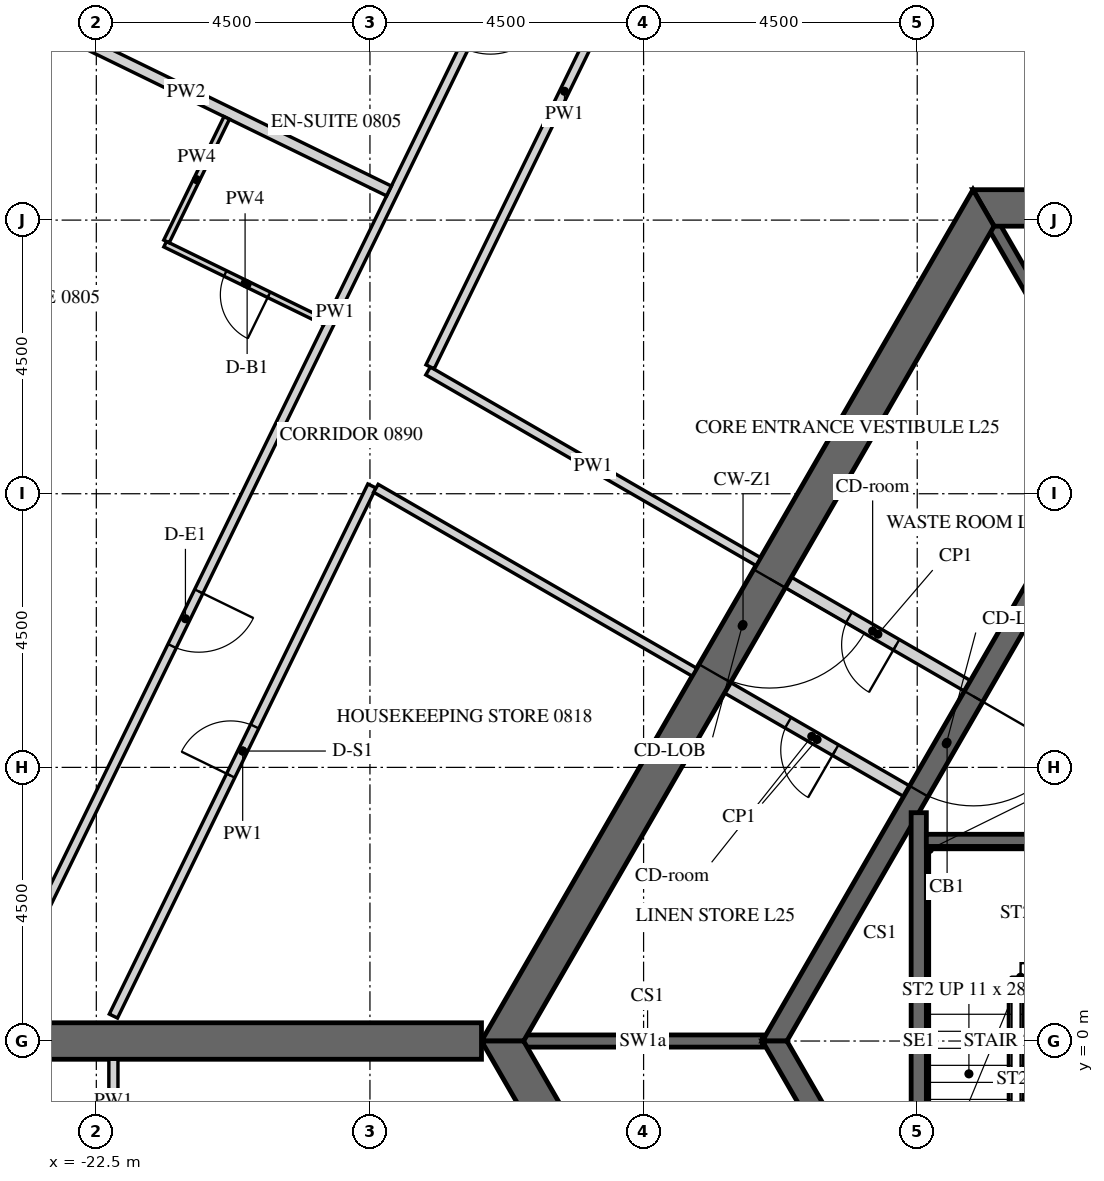
"""IFC4 building model, lengths in metres.
Left out: names, types, materials, properties, quantities, classifications, styles, units other than length and angle.
Written with IfcOpenShell. Run it as: python <this file> out.ifc"""

import sys

from ifc_helpers import new_model, si_unit, direction, frame, frame_2d, origin, place, context, subcontext, project, spatial, polyline, rectangle, outline, extrude, element, fill, save


model = new_model("IFC4")
c1 = context("Model", 3, precision=1e-05, world=origin(), true_north=direction((0.0, 1.0)))
c2 = subcontext(c1, "Body", "Model", "MODEL_VIEW")
j1 = project(units=[si_unit("LENGTHUNIT", "METRE"), si_unit("PLANEANGLEUNIT", "RADIAN")], contexts=[c1])
p1 = place(None, origin())
s1 = spatial("IfcSite", under=j1, at=p1, CompositionType="ELEMENT")
p2 = place(p1, origin())
s2 = spatial("IfcBuilding", under=s1, at=p2, CompositionType="ELEMENT")
p3 = place(p2, frame((0.0, 0.0, 111.6)))
s3 = spatial("IfcBuildingStorey", under=s2, at=p3, CompositionType="ELEMENT", Elevation=111.6)
p4 = place(p3, frame((-19.595, 27.633, -0.15), z_axis=(0.0, 0.0, 1.0), x_axis=(-0.438368285794, -0.898795441694, 0.0)))
e1 = element("IfcWall", 1, at=p4, inside=s3, PredefinedType="SOLIDWALL", context=c2, shape_type="SweptSolid", body=[
    extrude(outline(polyline([(-0.026, -0.275), (30.093, -0.275), (30.048, 0.275), (0.026, 0.275), (-0.026, -0.275)])), origin(), (0.0, 0.0, 1.0), 3.9),
])
p5 = place(p4, frame((1.236, 0.0, 1.05)))
e2 = element("IfcOpeningElement", 2, at=p5, cuts=e1, PredefinedType="OPENING", context=c2, shape_type="SweptSolid", body=[
    extrude(rectangle(XDim=2.4, YDim=2.4, at=frame_2d((1.2, 1.2))), frame((0.0, 0.285, 0.0), z_axis=(0.0, -1.0, 0.0), x_axis=(1.0, 0.0, 0.0)), (0.0, 0.0, 1.0), 0.57),
])
p6 = place(p4, frame((4.835, 0.0, 1.05)))
e3 = element("IfcOpeningElement", 3, at=p6, cuts=e1, PredefinedType="OPENING", context=c2, shape_type="SweptSolid", body=[
    extrude(rectangle(XDim=2.4, YDim=2.4, at=frame_2d((1.2, 1.2))), frame((0.0, 0.285, 0.0), z_axis=(0.0, -1.0, 0.0), x_axis=(1.0, 0.0, 0.0)), (0.0, 0.0, 1.0), 0.57),
])
p7 = place(p4, frame((8.436, 0.0, 1.05)))
e4 = element("IfcOpeningElement", 4, at=p7, cuts=e1, PredefinedType="OPENING", context=c2, shape_type="SweptSolid", body=[
    extrude(rectangle(XDim=2.4, YDim=2.4, at=frame_2d((1.2, 1.2))), frame((0.0, 0.285, 0.0), z_axis=(0.0, -1.0, 0.0), x_axis=(1.0, 0.0, 0.0)), (0.0, 0.0, 1.0), 0.57),
])
p8 = place(p4, frame((12.035, 0.0, 1.05)))
e5 = element("IfcOpeningElement", 5, at=p8, cuts=e1, PredefinedType="OPENING", context=c2, shape_type="SweptSolid", body=[
    extrude(rectangle(XDim=2.4, YDim=2.4, at=frame_2d((1.2, 1.2))), frame((0.0, 0.285, 0.0), z_axis=(0.0, -1.0, 0.0), x_axis=(1.0, 0.0, 0.0)), (0.0, 0.0, 1.0), 0.57),
])
p9 = place(p4, frame((15.635, 0.0, 1.05)))
e6 = element("IfcOpeningElement", 6, at=p9, cuts=e1, PredefinedType="OPENING", context=c2, shape_type="SweptSolid", body=[
    extrude(rectangle(XDim=2.4, YDim=2.4, at=frame_2d((1.2, 1.2))), frame((0.0, 0.285, 0.0), z_axis=(0.0, -1.0, 0.0), x_axis=(1.0, 0.0, 0.0)), (0.0, 0.0, 1.0), 0.57),
])
p10 = place(p4, frame((19.236, 0.0, 1.05)))
e7 = element("IfcOpeningElement", 7, at=p10, cuts=e1, PredefinedType="OPENING", context=c2, shape_type="SweptSolid", body=[
    extrude(rectangle(XDim=2.4, YDim=2.4, at=frame_2d((1.2, 1.2))), frame((0.0, 0.285, 0.0), z_axis=(0.0, -1.0, 0.0), x_axis=(1.0, 0.0, 0.0)), (0.0, 0.0, 1.0), 0.57),
])
p11 = place(p4, frame((22.835, 0.0, 1.05)))
e8 = element("IfcOpeningElement", 8, at=p11, cuts=e1, PredefinedType="OPENING", context=c2, shape_type="SweptSolid", body=[
    extrude(rectangle(XDim=2.4, YDim=2.4, at=frame_2d((1.2, 1.2))), frame((0.0, 0.285, 0.0), z_axis=(0.0, -1.0, 0.0), x_axis=(1.0, 0.0, 0.0)), (0.0, 0.0, 1.0), 0.57),
])
p12 = place(p4, frame((26.436, 0.0, 1.05)))
e9 = element("IfcOpeningElement", 9, at=p12, cuts=e1, PredefinedType="OPENING", context=c2, shape_type="SweptSolid", body=[
    extrude(rectangle(XDim=2.4, YDim=2.4, at=frame_2d((1.2, 1.2))), frame((0.0, 0.285, 0.0), z_axis=(0.0, -1.0, 0.0), x_axis=(1.0, 0.0, 0.0)), (0.0, 0.0, 1.0), 0.57),
])
p13 = place(p3, frame((-7.91, 13.7, -0.15), z_axis=(0.0, 0.0, 1.0), x_axis=(-0.499999880136, -0.866025472988, 0.0)))
e10 = element("IfcWall", 10, at=p13, inside=s3, PredefinedType="SHEAR", context=c2, shape_type="SweptSolid", body=[
    extrude(outline(polyline([(-0.173, -0.3), (15.993, -0.3), (15.646, 0.3), (0.173, 0.3), (-0.173, -0.3)])), origin(), (0.0, 0.0, 1.0), 3.9),
])
p14 = place(p13, frame((7.039, 0.0, 0.15)))
e11 = element("IfcOpeningElement", 11, at=p14, cuts=e10, PredefinedType="OPENING", context=c2, shape_type="SweptSolid", body=[
    extrude(rectangle(XDim=1.8, YDim=2.4, at=frame_2d((0.9, 1.2))), frame((0.0, 0.31, 0.0), z_axis=(0.0, -1.0, 0.0), x_axis=(1.0, 0.0, 0.0)), (0.0, 0.0, 1.0), 0.62),
])
p15 = place(p3, frame((-15.819, 0.0, -0.15), z_axis=(0.0, 0.0, 1.0), x_axis=(0.499999880136, -0.866025472988, 0.0)))
e12 = element("IfcWall", 12, at=p15, inside=s3, PredefinedType="SHEAR", context=c2, shape_type="SweptSolid", body=[
    extrude(outline(polyline([(-0.173, -0.3), (15.993, -0.3), (15.646, 0.3), (0.173, 0.3), (-0.173, -0.3)])), origin(), (0.0, 0.0, 1.0), 3.9),
])
p16 = place(p15, frame((6.981, 0.0, 0.15)))
e13 = element("IfcOpeningElement", 13, at=p16, cuts=e12, PredefinedType="OPENING", context=c2, shape_type="SweptSolid", body=[
    extrude(rectangle(XDim=1.8, YDim=2.4, at=frame_2d((0.9, 1.2))), frame((0.0, 0.31, 0.0), z_axis=(0.0, -1.0, 0.0), x_axis=(1.0, 0.0, 0.0)), (0.0, 0.0, 1.0), 0.62),
])
p17 = place(p3, frame((7.91, 13.7, -0.15), z_axis=(0.0, 0.0, 1.0), x_axis=(-1.0, 0.0, 0.0)))
e14 = element("IfcWall", 14, at=p17, inside=s3, PredefinedType="SHEAR", context=c2, shape_type="SweptSolid", body=[
    extrude(outline(polyline([(-0.173, -0.3), (15.993, -0.3), (15.646, 0.3), (0.173, 0.3), (-0.173, -0.3)])), origin(), (0.0, 0.0, 1.0), 3.9),
])
p18 = place(p17, frame((7.31, 0.0, 0.15)))
e15 = element("IfcOpeningElement", 15, at=p18, cuts=e14, PredefinedType="OPENING", context=c2, shape_type="SweptSolid", body=[
    extrude(rectangle(XDim=1.2, YDim=2.4, at=frame_2d((0.6, 1.2))), frame((0.0, 0.31, 0.0), z_axis=(0.0, -1.0, 0.0), x_axis=(1.0, 0.0, 0.0)), (0.0, 0.0, 1.0), 0.62),
])
p19 = place(p3, frame((-16.166, 0.0, -0.15), z_axis=(0.0, 0.0, 1.0), x_axis=(-1.0, 0.0, 0.0)))
e16 = element("IfcWall", 16, at=p19, inside=s3, PredefinedType="SHEAR", context=c2, shape_type="SweptSolid", body=[
    extrude(rectangle(XDim=16.509, YDim=0.6, at=frame_2d((8.254, 0.0))), origin(), (0.0, 0.0, 1.0), 3.9),
])
p20 = place(p19, frame((7.354, 0.0, 0.15)))
e17 = element("IfcOpeningElement", 17, at=p20, cuts=e16, PredefinedType="OPENING", context=c2, shape_type="SweptSolid", body=[
    extrude(rectangle(XDim=1.8, YDim=2.4, at=frame_2d((0.9, 1.2))), frame((0.0, 0.31, 0.0), z_axis=(0.0, -1.0, 0.0), x_axis=(1.0, 0.0, 0.0)), (0.0, 0.0, 1.0), 0.62),
])
p21 = place(p3, frame((-5.673, 9.825, -0.15), z_axis=(0.0, 0.0, 1.0), x_axis=(-0.499995046907, -0.866028263435, 0.0)))
e18 = element("IfcWall", 18, at=p21, inside=s3, PredefinedType="SHEAR", context=c2, shape_type="SweptSolid", body=[
    extrude(outline(polyline([(-0.101, -0.175), (11.446, -0.175), (11.244, 0.175), (0.101, 0.175), (-0.101, -0.175)])), origin(), (0.0, 0.0, 1.0), 3.9),
])
p22 = place(p21, frame((4.801, 0.0, 0.15)))
e19 = element("IfcOpeningElement", 19, at=p22, cuts=e18, PredefinedType="OPENING", context=c2, shape_type="SweptSolid", body=[
    extrude(rectangle(XDim=1.8, YDim=2.4, at=frame_2d((0.9, 1.2))), frame((0.0, 0.185, 0.0), z_axis=(0.0, -1.0, 0.0), x_axis=(1.0, 0.0, 0.0)), (0.0, 0.0, 1.0), 0.37),
])
p23 = place(p3, frame((-11.345, 0.0, -0.15), z_axis=(0.0, 0.0, 1.0), x_axis=(0.499995046907, -0.866028263435, 0.0)))
e20 = element("IfcWall", 20, at=p23, inside=s3, PredefinedType="SHEAR", context=c2, shape_type="SweptSolid", body=[
    extrude(outline(polyline([(-0.101, -0.175), (11.446, -0.175), (11.244, 0.175), (0.101, 0.175), (-0.101, -0.175)])), origin(), (0.0, 0.0, 1.0), 3.9),
])
p24 = place(p23, frame((4.744, 0.0, 0.15)))
e21 = element("IfcOpeningElement", 21, at=p24, cuts=e20, PredefinedType="OPENING", context=c2, shape_type="SweptSolid", body=[
    extrude(rectangle(XDim=1.8, YDim=2.4, at=frame_2d((0.9, 1.2))), frame((0.0, 0.185, 0.0), z_axis=(0.0, -1.0, 0.0), x_axis=(1.0, 0.0, 0.0)), (0.0, 0.0, 1.0), 0.37),
])
p25 = place(p3, frame((-5.773, 10.0, -0.15), z_axis=(0.0, 0.0, 1.0), x_axis=(-0.500038251005, 0.86600331843, 0.0)))
e22 = element("IfcWall", 22, at=p25, inside=s3, PredefinedType="SHEAR", context=c2, shape_type="SweptSolid", body=[
    extrude(rectangle(XDim=3.926, YDim=0.2, at=frame_2d((1.963, 0.0))), origin(), (0.0, 0.0, 1.0), 3.9),
])
p26 = place(p3, frame((-11.547, 0.0, -0.15), z_axis=(0.0, 0.0, 1.0), x_axis=(-1.0, 0.0, 0.0)))
e23 = element("IfcWall", 23, at=p26, inside=s3, PredefinedType="SHEAR", context=c2, shape_type="SweptSolid", body=[
    extrude(rectangle(XDim=3.926, YDim=0.2, at=frame_2d((1.963, 0.0))), origin(), (0.0, 0.0, 1.0), 3.9),
])
p27 = place(p3, frame((-9.175, 4.109, 0.0), z_axis=(0.0, 0.0, 1.0), x_axis=(-0.865989465428, 0.500062241894, 0.0)))
e24 = element("IfcWall", 24, at=p27, inside=s3, PredefinedType="PARTITIONING", context=c2, shape_type="SweptSolid", body=[
    extrude(rectangle(XDim=3.4, YDim=0.2, at=frame_2d((1.7, 0.0))), origin(), (0.0, 0.0, 1.0), 3.65),
])
p28 = place(p27, frame((1.351, 0.0, 0.0)))
e25 = element("IfcOpeningElement", 25, at=p28, cuts=e24, PredefinedType="OPENING", context=c2, shape_type="SweptSolid", body=[
    extrude(rectangle(XDim=0.9, YDim=2.1, at=frame_2d((0.45, 1.05))), frame((0.0, 0.11, 0.0), z_axis=(0.0, -1.0, 0.0), x_axis=(1.0, 0.0, 0.0)), (0.0, 0.0, 1.0), 0.22),
])
p29 = place(p3, frame((-8.175, 5.841, 0.0), z_axis=(0.0, 0.0, 1.0), x_axis=(-0.866020560687, 0.500008388397, 0.0)))
e26 = element("IfcWall", 26, at=p29, inside=s3, PredefinedType="PARTITIONING", context=c2, shape_type="SweptSolid", body=[
    extrude(rectangle(XDim=3.4, YDim=0.2, at=frame_2d((1.7, 0.0))), origin(), (0.0, 0.0, 1.0), 3.65),
])
p30 = place(p29, frame((1.35, 0.0, 0.0)))
e27 = element("IfcOpeningElement", 27, at=p30, cuts=e26, PredefinedType="OPENING", context=c2, shape_type="SweptSolid", body=[
    extrude(rectangle(XDim=0.9, YDim=2.1, at=frame_2d((0.45, 1.05))), frame((0.0, 0.11, 0.0), z_axis=(0.0, -1.0, 0.0), x_axis=(1.0, 0.0, 0.0)), (0.0, 0.0, 1.0), 0.22),
])
p31 = place(p3, frame((-8.975, -3.755, -0.25), z_axis=(0.0, 0.0, 1.0), x_axis=(0.0, 1.0, 0.0)))
e28 = element("IfcWall", 28, at=p31, inside=s3, PredefinedType="SHEAR", context=c2, shape_type="SweptSolid", body=[
    extrude(rectangle(XDim=7.51, YDim=0.25, at=frame_2d((3.755, 0.0))), origin(), (0.0, 0.0, 1.0), 3.9),
])
p32 = place(p3, frame((-8.85, 3.3, -0.25), z_axis=(0.0, 0.0, 1.0), x_axis=(1.0, 0.0, 0.0)))
e29 = element("IfcWall", 29, at=p32, inside=s3, PredefinedType="SHEAR", context=c2, shape_type="SweptSolid", body=[
    extrude(rectangle(XDim=2.95, YDim=0.2, at=frame_2d((1.475, 0.0))), origin(), (0.0, 0.0, 1.0), 3.9),
])
p33 = place(p3, frame((-13.752, 21.875, 0.0), z_axis=(0.0, 0.0, 1.0), x_axis=(-0.438376846054, -0.898791266559, 0.0)))
e30 = element("IfcWall", 30, at=p33, inside=s3, PredefinedType="PARTITIONING", context=c2, shape_type="SweptSolid", body=[
    extrude(rectangle(XDim=22.002, YDim=0.15, at=frame_2d((11.001, 0.0))), origin(), (0.0, 0.0, 1.0), 2.988),
])
p34 = place(p33, frame((5.169, 0.0, 0.0)))
e31 = element("IfcOpeningElement", 31, at=p34, cuts=e30, PredefinedType="OPENING", context=c2, shape_type="SweptSolid", body=[
    extrude(rectangle(XDim=1.0, YDim=2.1, at=frame_2d((0.5, 1.05))), frame((0.0, 0.085, 0.0), z_axis=(0.0, -1.0, 0.0), x_axis=(1.0, 0.0, 0.0)), (0.0, 0.0, 1.0), 0.17),
])
p35 = place(p33, frame((16.112, 0.0, 0.0)))
e32 = element("IfcOpeningElement", 32, at=p35, cuts=e30, PredefinedType="OPENING", context=c2, shape_type="SweptSolid", body=[
    extrude(rectangle(XDim=1.0, YDim=2.1, at=frame_2d((0.5, 1.05))), frame((0.0, 0.085, 0.0), z_axis=(0.0, -1.0, 0.0), x_axis=(1.0, 0.0, 0.0)), (0.0, 0.0, 1.0), 0.17),
])
p36 = place(p3, frame((-11.614, 7.884, 0.0), z_axis=(0.0, 0.0, 1.0), x_axis=(-0.866025438137, 0.4999999405, 0.0)))
e33 = element("IfcWall", 33, at=p36, inside=s3, PredefinedType="PARTITIONING", context=c2, shape_type="SweptSolid", body=[
    extrude(rectangle(XDim=6.271, YDim=0.15, at=frame_2d((3.135, 0.0))), origin(), (0.0, 0.0, 1.0), 2.988),
])
p37 = place(p3, frame((-17.011, 11.087, 0.0), z_axis=(0.0, 0.0, 1.0), x_axis=(0.43836877185, 0.898795204631, 0.0)))
e34 = element("IfcWall", 34, at=p37, inside=s3, PredefinedType="PARTITIONING", context=c2, shape_type="SweptSolid", body=[
    extrude(rectangle(XDim=10.083, YDim=0.15, at=frame_2d((5.042, 0.0))), origin(), (0.0, 0.0, 1.0), 2.988),
])
p38 = place(p3, frame((-22.219, 0.41, 0.0), z_axis=(0.0, 0.0, 1.0), x_axis=(0.438391891827, 0.898783927972, 0.0)))
e35 = element("IfcWall", 35, at=p38, inside=s3, PredefinedType="PARTITIONING", context=c2, shape_type="SweptSolid", body=[
    extrude(rectangle(XDim=9.699, YDim=0.15, at=frame_2d((4.85, 0.0))), origin(), (0.0, 0.0, 1.0), 2.988),
])
p39 = place(p38, frame((4.4, 0.0, 0.0)))
e36 = element("IfcOpeningElement", 36, at=p39, cuts=e35, PredefinedType="OPENING", context=c2, shape_type="SweptSolid", body=[
    extrude(rectangle(XDim=0.9, YDim=2.1, at=frame_2d((0.45, 1.05))), frame((0.0, 0.085, 0.0), z_axis=(0.0, -1.0, 0.0), x_axis=(1.0, 0.0, 0.0)), (0.0, 0.0, 1.0), 0.17),
])
p40 = place(p3, frame((-17.902, 9.09, 0.0), z_axis=(0.0, 0.0, 1.0), x_axis=(0.866036368755, -0.499981007633, 0.0)))
e37 = element("IfcWall", 37, at=p40, inside=s3, PredefinedType="PARTITIONING", context=c2, shape_type="SweptSolid", body=[
    extrude(rectangle(XDim=6.049, YDim=0.15, at=frame_2d((3.024, 0.0))), origin(), (0.0, 0.0, 1.0), 2.988),
])
p41 = place(p3, frame((-22.219, -1.666, 0.0), z_axis=(0.0, 0.0, 1.0), x_axis=(0.0, 1.0, 0.0)))
e38 = element("IfcWall", 38, at=p41, inside=s3, PredefinedType="PARTITIONING", context=c2, shape_type="SweptSolid", body=[
    extrude(rectangle(XDim=1.366, YDim=0.15, at=frame_2d((0.683, 0.0))), origin(), (0.0, 0.0, 1.0), 2.988),
])
p42 = place(p3, frame((-24.36, 17.234, 0.0), z_axis=(0.0, 0.0, 1.0), x_axis=(0.898796252669, -0.438366623032, 0.0)))
e39 = element("IfcWall", 39, at=p42, inside=s3, PredefinedType="PARTITIONING", context=c2, shape_type="SweptSolid", body=[
    extrude(rectangle(XDim=7.425, YDim=0.18, at=frame_2d((3.712, 0.0))), origin(), (0.0, 0.0, 1.0), 2.988),
])
p43 = place(p3, frame((-18.739, 11.822, 0.0), z_axis=(0.0, 0.0, 1.0), x_axis=(-0.898790906006, 0.438377585285, 0.0)))
e40 = element("IfcWall", 40, at=p43, inside=s3, PredefinedType="PARTITIONING", context=c2, shape_type="SweptSolid", body=[
    extrude(rectangle(XDim=2.925, YDim=0.1, at=frame_2d((1.462, 0.0))), origin(), (0.0, 0.0, 1.0), 2.988),
])
p44 = place(p43, frame((1.025, 0.0, 0.0)))
e41 = element("IfcOpeningElement", 41, at=p44, cuts=e40, PredefinedType="OPENING", context=c2, shape_type="SweptSolid", body=[
    extrude(rectangle(XDim=0.8, YDim=2.1, at=frame_2d((0.4, 1.05))), frame((0.0, 0.06, 0.0), z_axis=(0.0, -1.0, 0.0), x_axis=(1.0, 0.0, 0.0)), (0.0, 0.0, 1.0), 0.12),
])
p45 = place(p3, frame((-21.346, 13.149, 0.0), z_axis=(0.0, 0.0, 1.0), x_axis=(0.438376807268, 0.898791285477, 0.0)))
e42 = element("IfcWall", 42, at=p45, inside=s3, PredefinedType="PARTITIONING", context=c2, shape_type="SweptSolid", body=[
    extrude(rectangle(XDim=2.26, YDim=0.1, at=frame_2d((1.13, 0.0))), origin(), (0.0, 0.0, 1.0), 2.988),
])
p46 = place(p14, origin())
e43 = element("IfcDoor", 43, at=p46, inside=s3, OperationType="DOUBLE_DOOR_SINGLE_SWING", PredefinedType="DOOR", context=c2, shape_type="SweptSolid", body=[
    extrude(rectangle(XDim=1.8, YDim=2.4, at=frame_2d((0.9, 1.2))), frame((0.0, 0.025, 0.0), z_axis=(0.0, -1.0, 0.0), x_axis=(1.0, 0.0, 0.0)), (0.0, 0.0, 1.0), 0.05),
])
fill(e11, e43)
p47 = place(p22, origin())
e44 = element("IfcDoor", 44, at=p47, inside=s3, OperationType="DOUBLE_DOOR_SINGLE_SWING", PredefinedType="DOOR", context=c2, shape_type="SweptSolid", body=[
    extrude(rectangle(XDim=1.8, YDim=2.4, at=frame_2d((0.9, 1.2))), frame((0.0, 0.025, 0.0), z_axis=(0.0, -1.0, 0.0), x_axis=(1.0, 0.0, 0.0)), (0.0, 0.0, 1.0), 0.05),
])
fill(e19, e44)
p48 = place(p28, origin())
e45 = element("IfcDoor", 45, at=p48, inside=s3, OperationType="SINGLE_SWING_LEFT", PredefinedType="DOOR", context=c2, shape_type="SweptSolid", body=[
    extrude(rectangle(XDim=0.9, YDim=2.1, at=frame_2d((0.45, 1.05))), frame((0.0, 0.025, 0.0), z_axis=(0.0, -1.0, 0.0), x_axis=(1.0, 0.0, 0.0)), (0.0, 0.0, 1.0), 0.05),
])
fill(e25, e45)
p49 = place(p30, origin())
e46 = element("IfcDoor", 46, at=p49, inside=s3, OperationType="SINGLE_SWING_LEFT", PredefinedType="DOOR", context=c2, shape_type="SweptSolid", body=[
    extrude(rectangle(XDim=0.9, YDim=2.1, at=frame_2d((0.45, 1.05))), frame((0.0, 0.025, 0.0), z_axis=(0.0, -1.0, 0.0), x_axis=(1.0, 0.0, 0.0)), (0.0, 0.0, 1.0), 0.05),
])
fill(e27, e46)
p50 = place(p35, origin())
e47 = element("IfcDoor", 47, at=p50, inside=s3, OperationType="SINGLE_SWING_LEFT", PredefinedType="DOOR", context=c2, shape_type="SweptSolid", body=[
    extrude(rectangle(XDim=1.0, YDim=2.1, at=frame_2d((0.5, 1.05))), frame((0.0, 0.025, 0.0), z_axis=(0.0, -1.0, 0.0), x_axis=(1.0, 0.0, 0.0)), (0.0, 0.0, 1.0), 0.05),
])
fill(e32, e47)
p51 = place(p44, origin())
e48 = element("IfcDoor", 48, at=p51, inside=s3, OperationType="SINGLE_SWING_RIGHT", PredefinedType="DOOR", context=c2, shape_type="SweptSolid", body=[
    extrude(rectangle(XDim=0.8, YDim=2.1, at=frame_2d((0.4, 1.05))), frame((0.0, 0.025, 0.0), z_axis=(0.0, -1.0, 0.0), x_axis=(1.0, 0.0, 0.0)), (0.0, 0.0, 1.0), 0.05),
])
fill(e41, e48)
p52 = place(p39, origin())
e49 = element("IfcDoor", 49, at=p52, inside=s3, OperationType="SINGLE_SWING_LEFT", PredefinedType="DOOR", context=c2, shape_type="SweptSolid", body=[
    extrude(rectangle(XDim=0.9, YDim=2.1, at=frame_2d((0.45, 1.05))), frame((0.0, 0.025, 0.0), z_axis=(0.0, -1.0, 0.0), x_axis=(1.0, 0.0, 0.0)), (0.0, 0.0, 1.0), 0.05),
])
fill(e36, e49)
save(model, sys.argv[1])
